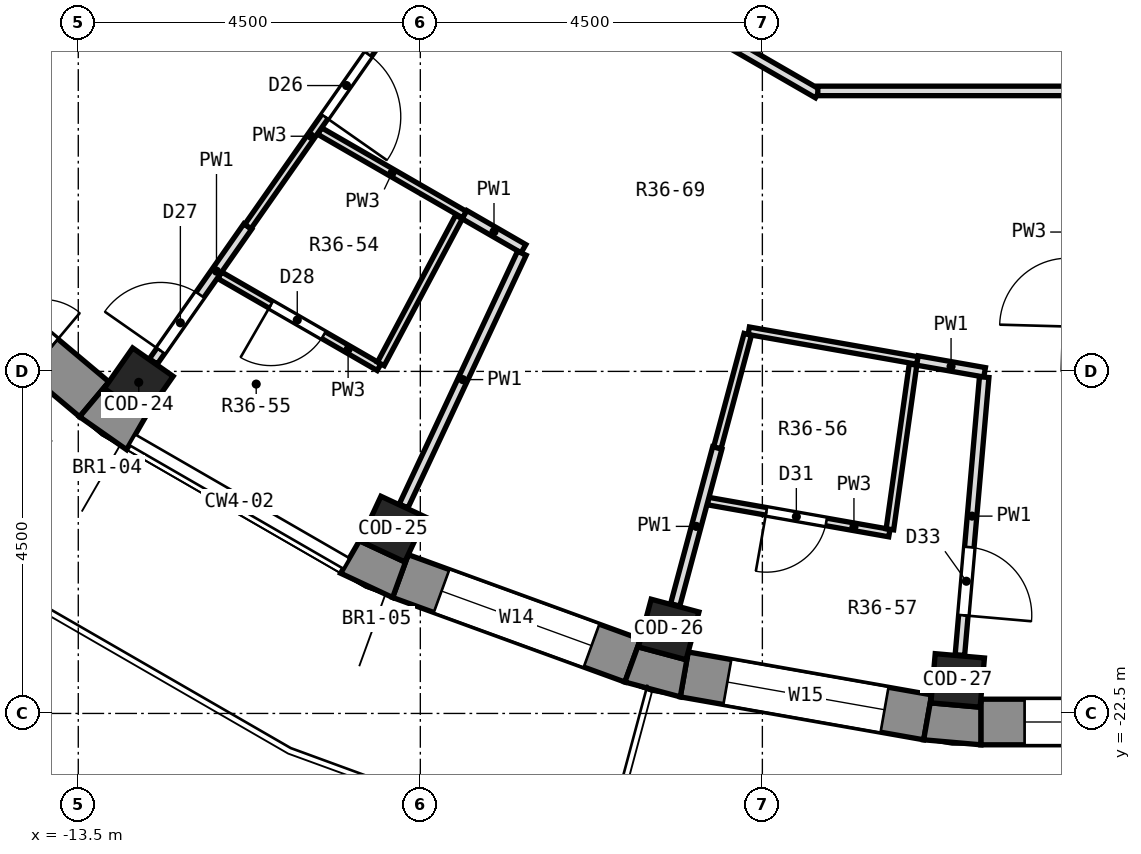
"""IFC4 building model, lengths in metres.
Left out: names, types, materials, properties, quantities, classifications, styles, units other than length and angle.
Written with IfcOpenShell. Run it as: python <this file> out.ifc"""

import sys

from ifc_helpers import new_model, si_unit, direction, frame, frame_2d, origin, origin_2d, place, context, subcontext, project, spatial, polyline, rectangle, outline, extrude, element, fill, save


model = new_model("IFC4")
c1 = context("Model", 3, precision=1e-05, world=origin(), true_north=direction((0.0, 1.0)))
c2 = subcontext(c1, "Body", "Model", "MODEL_VIEW")
j1 = project(units=[si_unit("LENGTHUNIT", "METRE"), si_unit("PLANEANGLEUNIT", "RADIAN")], contexts=[c1])
p1 = place(None, origin())
s1 = spatial("IfcSite", under=j1, at=p1, CompositionType="ELEMENT")
p2 = place(p1, origin())
s2 = spatial("IfcBuilding", under=s1, at=p2, CompositionType="ELEMENT")
p3 = place(p2, frame((0.0, 0.0, 259.4)))
s3 = spatial("IfcBuildingStorey", under=s2, at=p3, CompositionType="ELEMENT", Elevation=259.4)
for number, where, z_axis, x_axis in (
    (1, (-12.705, -18.144, 0.0), (0.0, 0.0, 1.0), (-0.574, -0.819, 0.0)),
    (2, (-9.361, -20.075, 0.0), (0.0, 0.0, 1.0), (-0.423, -0.906, 0.0)),
    (3, (-5.733, -21.395, 0.0), (0.0, 0.0, 1.0), (-0.259, -0.966, 0.0)),
    (4, (-1.93, -22.066, 0.0), (0.0, 0.0, 1.0), (-0.087, -0.996, 0.0)),
):
    element("IfcColumn", number, at=place(p3, frame(where, z_axis=z_axis, x_axis=x_axis)), inside=s3, PredefinedType="COLUMN", context=c2, shape_type="SweptSolid", body=[
        extrude(rectangle(XDim=0.65, YDim=0.65, at=origin_2d()), origin(), (0.0, 0.0, 1.0), 3.3),
    ])
p4 = place(p3, frame((-15.781, -16.277, 0.0), z_axis=(0.0, 0.0, 1.0), x_axis=(0.766056773982, -0.64277291405, 0.0)))
e5 = element("IfcWall", 5, at=p4, inside=s3, PredefinedType="SOLIDWALL", context=c2, shape_type="SweptSolid", body=[
    extrude(rectangle(XDim=3.252, YDim=0.6, at=frame_2d((1.626, 0.0))), origin(), (0.0, 0.0, 1.0), 2.9),
])
p5 = place(p4, frame((0.876, 0.0, 0.0)))
e6 = element("IfcOpeningElement", 6, at=p5, cuts=e5, PredefinedType="OPENING", context=c2, shape_type="SweptSolid", body=[
    extrude(rectangle(XDim=1.5, YDim=2.4, at=frame_2d((0.75, 1.2))), frame((0.0, 0.312, 0.0), z_axis=(0.0, -1.0, 0.0), x_axis=(1.0, 0.0, 0.0)), (0.0, 0.0, 1.0), 0.624),
])
p6 = place(p3, frame((-9.262, -20.693, 0.0), z_axis=(0.0, 0.0, 1.0), x_axis=(0.939679383794, -0.342056509473, 0.0)))
e7 = element("IfcWall", 7, at=p6, inside=s3, PredefinedType="SOLIDWALL", context=c2, shape_type="SweptSolid", body=[
    extrude(rectangle(XDim=3.252, YDim=0.6, at=frame_2d((1.626, 0.0))), origin(), (0.0, 0.0, 1.0), 2.9),
])
p7 = place(p6, frame((0.576, 0.0, 0.9)))
e8 = element("IfcOpeningElement", 8, at=p7, cuts=e7, PredefinedType="OPENING", context=c2, shape_type="SweptSolid", body=[
    extrude(rectangle(XDim=2.1, YDim=1.8, at=frame_2d((1.05, 0.9))), frame((0.0, 0.312, 0.0), z_axis=(0.0, -1.0, 0.0), x_axis=(1.0, 0.0, 0.0)), (0.0, 0.0, 1.0), 0.624),
])
p8 = place(p3, frame((-5.528, -21.987, 0.0), z_axis=(0.0, 0.0, 1.0), x_axis=(0.984806225186, -0.173656842178, 0.0)))
e9 = element("IfcWall", 9, at=p8, inside=s3, PredefinedType="SOLIDWALL", context=c2, shape_type="SweptSolid", body=[
    extrude(rectangle(XDim=3.252, YDim=0.6, at=frame_2d((1.626, 0.0))), origin(), (0.0, 0.0, 1.0), 2.9),
])
p9 = place(p8, frame((0.576, 0.0, 0.9)))
e10 = element("IfcOpeningElement", 10, at=p9, cuts=e9, PredefinedType="OPENING", context=c2, shape_type="SweptSolid", body=[
    extrude(rectangle(XDim=2.1, YDim=1.8, at=frame_2d((1.05, 0.9))), frame((0.0, 0.312, 0.0), z_axis=(0.0, -1.0, 0.0), x_axis=(1.0, 0.0, 0.0)), (0.0, 0.0, 1.0), 0.624),
])
p10 = place(p3, frame((-1.626, -22.613, 0.0), z_axis=(0.0, 0.0, 1.0), x_axis=(1.0, 0.0, 0.0)))
e11 = element("IfcWall", 11, at=p10, inside=s3, PredefinedType="SOLIDWALL", context=c2, shape_type="SweptSolid", body=[
    extrude(rectangle(XDim=3.251, YDim=0.6, at=frame_2d((1.626, 0.0))), origin(), (0.0, 0.0, 1.0), 2.9),
])
p11 = place(p10, frame((0.576, 0.0, 0.9)))
e12 = element("IfcOpeningElement", 12, at=p11, cuts=e11, PredefinedType="OPENING", context=c2, shape_type="SweptSolid", body=[
    extrude(rectangle(XDim=2.1, YDim=1.8, at=frame_2d((1.05, 0.9))), frame((0.0, 0.312, 0.0), z_axis=(0.0, -1.0, 0.0), x_axis=(1.0, 0.0, 0.0)), (0.0, 0.0, 1.0), 0.624),
])
p12 = place(p3, origin())
e13 = element("IfcWall", 13, at=p12, inside=s3, PredefinedType="SOLIDWALL", context=c2, shape_type="SweptSolid", body=[
    extrude(outline(polyline([(-12.864, -19.03), (-12.564, -18.51), (-12.625, -18.597), (-13.157, -18.224), (-13.097, -18.137), (-13.482, -18.597), (-12.864, -19.03)])), origin(), (0.0, 0.0, 1.0), 2.9),
])
p13 = place(p3, origin())
e14 = element("IfcWall", 14, at=p13, inside=s3, PredefinedType="SOLIDWALL", context=c2, shape_type="SweptSolid", body=[
    extrude(outline(polyline([(-10.048, -20.656), (-9.364, -20.975), (-9.159, -20.411), (-9.204, -20.507), (-9.793, -20.232), (-9.748, -20.136), (-10.048, -20.656)])), origin(), (0.0, 0.0, 1.0), 2.9),
])
p14 = place(p3, origin())
e15 = element("IfcWall", 15, at=p14, inside=s3, PredefinedType="SOLIDWALL", context=c2, shape_type="SweptSolid", body=[
    extrude(outline(polyline([(-5.58, -22.282), (-5.476, -21.691), (-5.503, -21.793), (-6.131, -21.625), (-6.104, -21.523), (-6.309, -22.087), (-5.58, -22.282)])), origin(), (0.0, 0.0, 1.0), 2.9),
])
p15 = place(p3, origin())
e16 = element("IfcWall", 16, at=p15, inside=s3, PredefinedType="SOLIDWALL", context=c2, shape_type="SweptSolid", body=[
    extrude(outline(polyline([(-2.378, -22.847), (-1.626, -22.913), (-1.626, -22.312), (-1.635, -22.418), (-2.283, -22.361), (-2.273, -22.256), (-2.378, -22.847)])), origin(), (0.0, 0.0, 1.0), 2.9),
])
p16 = place(p3, frame((-11.639, -16.735, 0.0), z_axis=(0.0, 0.0, 1.0), x_axis=(0.866093196455, -0.499882561262, 0.0)))
e17 = element("IfcWall", 17, at=p16, inside=s3, PredefinedType="PARTITIONING", context=c2, shape_type="SweptSolid", body=[
    extrude(rectangle(XDim=2.42, YDim=0.1, at=frame_2d((1.21, 0.0))), origin(), (0.0, 0.0, 1.0), 2.9),
])
p17 = place(p16, frame((0.778, 0.0, 0.0)))
e18 = element("IfcOpeningElement", 18, at=p17, cuts=e17, PredefinedType="OPENING", context=c2, shape_type="SweptSolid", body=[
    extrude(rectangle(XDim=0.8, YDim=2.1, at=frame_2d((0.4, 1.05))), frame((0.0, 0.062, 0.0), z_axis=(0.0, -1.0, 0.0), x_axis=(1.0, 0.0, 0.0)), (0.0, 0.0, 1.0), 0.124),
])
p18 = place(p3, frame((-10.324, -14.838, 0.0), z_axis=(0.0, 0.0, 1.0), x_axis=(0.866035918664, -0.499981787252, 0.0)))
e19 = element("IfcWall", 19, at=p18, inside=s3, PredefinedType="PARTITIONING", context=c2, shape_type="SweptSolid", body=[
    extrude(rectangle(XDim=2.2, YDim=0.1, at=frame_2d((1.1, 0.0))), origin(), (0.0, 0.0, 1.0), 2.9),
])
p19 = place(p3, frame((-8.419, -15.938, 0.0), z_axis=(0.0, 0.0, 1.0), x_axis=(0.866053945006, -0.499950561895, 0.0)))
e20 = element("IfcWall", 20, at=p19, inside=s3, PredefinedType="PARTITIONING", context=c2, shape_type="SweptSolid", body=[
    extrude(rectangle(XDim=0.896, YDim=0.125, at=frame_2d((0.448, 0.0))), origin(), (0.0, 0.0, 1.0), 2.9),
])
p20 = place(p3, frame((-10.476, -10.476, 0.0), z_axis=(0.0, 0.0, 1.0), x_axis=(0.866073222863, -0.499917165778, 0.0)))
e21 = element("IfcWall", 21, at=p20, inside=s3, PredefinedType="PARTITIONING", context=c2, shape_type="SweptSolid", body=[
    extrude(rectangle(XDim=7.742, YDim=0.125, at=frame_2d((3.871, 0.0))), origin(), (0.0, 0.0, 1.0), 2.9),
])
p21 = place(p3, frame((-5.215, -19.706, 0.0), z_axis=(0.0, 0.0, 1.0), x_axis=(0.984780515727, -0.173802577208, 0.0)))
e22 = element("IfcWall", 22, at=p21, inside=s3, PredefinedType="PARTITIONING", context=c2, shape_type="SweptSolid", body=[
    extrude(rectangle(XDim=2.423, YDim=0.1, at=frame_2d((1.211, 0.0))), origin(), (0.0, 0.0, 1.0), 2.9),
])
p22 = place(p21, frame((0.781, 0.0, 0.0)))
e23 = element("IfcOpeningElement", 23, at=p22, cuts=e22, PredefinedType="OPENING", context=c2, shape_type="SweptSolid", body=[
    extrude(rectangle(XDim=0.8, YDim=2.1, at=frame_2d((0.4, 1.05))), frame((0.0, 0.062, 0.0), z_axis=(0.0, -1.0, 0.0), x_axis=(1.0, 0.0, 0.0)), (0.0, 0.0, 1.0), 0.124),
])
p23 = place(p3, frame((-4.679, -17.465, 0.0), z_axis=(0.0, 0.0, 1.0), x_axis=(0.984785740028, -0.173772973268, 0.0)))
e24 = element("IfcWall", 24, at=p23, inside=s3, PredefinedType="PARTITIONING", context=c2, shape_type="SweptSolid", body=[
    extrude(rectangle(XDim=2.253, YDim=0.1, at=frame_2d((1.127, 0.0))), origin(), (0.0, 0.0, 1.0), 2.9),
])
p24 = place(p3, frame((-2.46, -17.857, 0.0), z_axis=(0.0, 0.0, 1.0), x_axis=(0.984914749924, -0.173040270981, 0.0)))
e25 = element("IfcWall", 25, at=p24, inside=s3, PredefinedType="PARTITIONING", context=c2, shape_type="SweptSolid", body=[
    extrude(rectangle(XDim=0.897, YDim=0.125, at=frame_2d((0.449, 0.0))), origin(), (0.0, 0.0, 1.0), 2.9),
])
p25 = place(p3, frame((-3.771, -14.31, 0.0), z_axis=(0.0, 0.0, 1.0), x_axis=(1.0, 0.0, 0.0)))
e26 = element("IfcWall", 26, at=p25, inside=s3, PredefinedType="PARTITIONING", context=c2, shape_type="SweptSolid", body=[
    extrude(rectangle(XDim=7.677, YDim=0.125, at=frame_2d((3.838, 0.0))), origin(), (0.0, 0.0, 1.0), 2.9),
])
p26 = place(p3, frame((-12.513, -17.87, 0.0), z_axis=(0.0, 0.0, 1.0), x_axis=(0.573296063173, 0.819348292212, 0.0)))
e27 = element("IfcWall", 27, at=p26, inside=s3, PredefinedType="PARTITIONING", context=c2, shape_type="SweptSolid", body=[
    extrude(rectangle(XDim=2.168, YDim=0.125, at=frame_2d((1.084, 0.0))), origin(), (0.0, 0.0, 1.0), 2.9),
])
p27 = place(p26, frame((0.171, 0.0, 0.0)))
e28 = element("IfcOpeningElement", 28, at=p27, cuts=e27, PredefinedType="OPENING", context=c2, shape_type="SweptSolid", body=[
    extrude(rectangle(XDim=0.9, YDim=2.1, at=frame_2d((0.45, 1.05))), frame((0.0, 0.074, 0.0), z_axis=(0.0, -1.0, 0.0), x_axis=(1.0, 0.0, 0.0)), (0.0, 0.0, 1.0), 0.149),
])
p28 = place(p3, frame((-11.269, -16.094, 0.0), z_axis=(0.0, 0.0, 1.0), x_axis=(0.573597334784, 0.819137410651, 0.0)))
e29 = element("IfcWall", 29, at=p28, inside=s3, PredefinedType="PARTITIONING", context=c2, shape_type="SweptSolid", body=[
    extrude(rectangle(XDim=5.219, YDim=0.1, at=frame_2d((2.609, 0.0))), origin(), (0.0, 0.0, 1.0), 2.9),
])
p29 = place(p28, frame((4.114, 0.0, 0.0)))
e30 = element("IfcOpeningElement", 30, at=p29, cuts=e29, PredefinedType="OPENING", context=c2, shape_type="SweptSolid", body=[
    extrude(rectangle(XDim=0.9, YDim=2.1, at=frame_2d((0.45, 1.05))), frame((0.0, 0.062, 0.0), z_axis=(0.0, -1.0, 0.0), x_axis=(1.0, 0.0, 0.0)), (0.0, 0.0, 1.0), 0.124),
])
p30 = place(p28, frame((3.014, 0.0, 0.0)))
e31 = element("IfcOpeningElement", 31, at=p30, cuts=e29, PredefinedType="OPENING", context=c2, shape_type="SweptSolid", body=[
    extrude(rectangle(XDim=0.9, YDim=2.1, at=frame_2d((0.45, 1.05))), frame((0.0, 0.062, 0.0), z_axis=(0.0, -1.0, 0.0), x_axis=(1.0, 0.0, 0.0)), (0.0, 0.0, 1.0), 0.124),
])
p31 = place(p28, frame((1.764, 0.0, 0.0)))
e32 = element("IfcOpeningElement", 32, at=p31, cuts=e29, PredefinedType="OPENING", context=c2, shape_type="SweptSolid", body=[
    extrude(rectangle(XDim=1.0, YDim=2.1, at=frame_2d((0.5, 1.05))), frame((0.0, 0.062, 0.0), z_axis=(0.0, -1.0, 0.0), x_axis=(1.0, 0.0, 0.0)), (0.0, 0.0, 1.0), 0.124),
])
p32 = place(p3, frame((-9.52, -17.901, 0.0), z_axis=(0.0, 0.0, 1.0), x_axis=(0.469644416179, 0.882855663374, 0.0)))
e33 = element("IfcWall", 33, at=p32, inside=s3, PredefinedType="PARTITIONING", context=c2, shape_type="SweptSolid", body=[
    extrude(rectangle(XDim=2.189, YDim=0.1, at=frame_2d((1.094, 0.0))), origin(), (0.0, 0.0, 1.0), 2.9),
])
p33 = place(p3, frame((-9.22, -19.771, 0.0), z_axis=(0.0, 0.0, 1.0), x_axis=(0.4238971674, 0.90571032426, 0.0)))
e34 = element("IfcWall", 34, at=p33, inside=s3, PredefinedType="PARTITIONING", context=c2, shape_type="SweptSolid", body=[
    extrude(rectangle(XDim=3.672, YDim=0.125, at=frame_2d((1.836, 0.0))), origin(), (0.0, 0.0, 1.0), 2.9),
])
p34 = place(p3, frame((-5.093, -19.007, 0.0), z_axis=(0.0, 0.0, 1.0), x_axis=(0.259175252444, 0.965830310417, 0.0)))
e35 = element("IfcWall", 35, at=p34, inside=s3, PredefinedType="PARTITIONING", context=c2, shape_type="SweptSolid", body=[
    extrude(rectangle(XDim=1.547, YDim=0.1, at=frame_2d((0.773, 0.0))), origin(), (0.0, 0.0, 1.0), 2.9),
])
p35 = place(p3, frame((-5.647, -21.072, 0.0), z_axis=(0.0, 0.0, 1.0), x_axis=(0.259084380683, 0.965854690772, 0.0)))
e36 = element("IfcWall", 36, at=p35, inside=s3, PredefinedType="PARTITIONING", context=c2, shape_type="SweptSolid", body=[
    extrude(rectangle(XDim=2.137, YDim=0.125, at=frame_2d((1.069, 0.0))), origin(), (0.0, 0.0, 1.0), 2.9),
])
p36 = place(p3, frame((-2.822, -20.077, 0.0), z_axis=(0.0, 0.0, 1.0), x_axis=(0.139000144369, 0.990292360803, 0.0)))
e37 = element("IfcWall", 37, at=p36, inside=s3, PredefinedType="PARTITIONING", context=c2, shape_type="SweptSolid", body=[
    extrude(rectangle(XDim=2.188, YDim=0.1, at=frame_2d((1.094, 0.0))), origin(), (0.0, 0.0, 1.0), 2.9),
])
p37 = place(p3, frame((-1.901, -21.732, 0.0), z_axis=(0.0, 0.0, 1.0), x_axis=(0.087128997152, 0.996197037666, 0.0)))
e38 = element("IfcWall", 38, at=p37, inside=s3, PredefinedType="PARTITIONING", context=c2, shape_type="SweptSolid", body=[
    extrude(rectangle(XDim=3.671, YDim=0.125, at=frame_2d((1.835, 0.0))), origin(), (0.0, 0.0, 1.0), 2.9),
])
p38 = place(p37, frame((0.525, 0.0, 0.0)))
e39 = element("IfcOpeningElement", 39, at=p38, cuts=e38, PredefinedType="OPENING", context=c2, shape_type="SweptSolid", body=[
    extrude(rectangle(XDim=0.9, YDim=2.1, at=frame_2d((0.45, 1.05))), frame((0.0, 0.074, 0.0), z_axis=(0.0, -1.0, 0.0), x_axis=(1.0, 0.0, 0.0)), (0.0, 0.0, 1.0), 0.149),
])
p39 = place(p7, origin())
e40 = element("IfcWindow", 40, at=p39, inside=s3, PartitioningType="SINGLE_PANEL", PredefinedType="WINDOW", context=c2, shape_type="SweptSolid", body=[
    extrude(rectangle(XDim=2.1, YDim=1.8, at=frame_2d((1.05, 0.9))), frame((0.0, 0.18, 0.0), z_axis=(0.0, -1.0, 0.0), x_axis=(1.0, 0.0, 0.0)), (0.0, 0.0, 1.0), 0.06),
])
fill(e8, e40)
p40 = place(p9, origin())
e41 = element("IfcWindow", 41, at=p40, inside=s3, PartitioningType="SINGLE_PANEL", PredefinedType="WINDOW", context=c2, shape_type="SweptSolid", body=[
    extrude(rectangle(XDim=2.1, YDim=1.8, at=frame_2d((1.05, 0.9))), frame((0.0, 0.18, 0.0), z_axis=(0.0, -1.0, 0.0), x_axis=(1.0, 0.0, 0.0)), (0.0, 0.0, 1.0), 0.06),
])
fill(e10, e41)
p41 = place(p11, origin())
e42 = element("IfcWindow", 42, at=p41, inside=s3, PartitioningType="SINGLE_PANEL", PredefinedType="WINDOW", context=c2, shape_type="SweptSolid", body=[
    extrude(rectangle(XDim=2.1, YDim=1.8, at=frame_2d((1.05, 0.9))), frame((0.0, 0.18, 0.0), z_axis=(0.0, -1.0, 0.0), x_axis=(1.0, 0.0, 0.0)), (0.0, 0.0, 1.0), 0.06),
])
fill(e12, e42)
p42 = place(p31, frame((1.0, 0.0, 0.0), z_axis=(0.0, 0.0, 1.0), x_axis=(-1.0, 0.0, 0.0)))
e43 = element("IfcDoor", 43, at=p42, inside=s3, OperationType="SINGLE_SWING_RIGHT", PredefinedType="DOOR", context=c2, shape_type="SweptSolid", body=[
    extrude(rectangle(XDim=1.0, YDim=2.1, at=frame_2d((0.5, 1.05))), frame((0.0, 0.025, 0.0), z_axis=(0.0, -1.0, 0.0), x_axis=(1.0, 0.0, 0.0)), (0.0, 0.0, 1.0), 0.05),
])
fill(e32, e43)
p43 = place(p27, origin())
e44 = element("IfcDoor", 44, at=p43, inside=s3, OperationType="SINGLE_SWING_LEFT", PredefinedType="DOOR", context=c2, shape_type="SweptSolid", body=[
    extrude(rectangle(XDim=0.9, YDim=2.1, at=frame_2d((0.45, 1.05))), frame((0.0, 0.025, 0.0), z_axis=(0.0, -1.0, 0.0), x_axis=(1.0, 0.0, 0.0)), (0.0, 0.0, 1.0), 0.05),
])
fill(e28, e44)
p44 = place(p17, frame((0.8, 0.0, 0.0), z_axis=(0.0, 0.0, 1.0), x_axis=(-1.0, 0.0, 0.0)))
e45 = element("IfcDoor", 45, at=p44, inside=s3, OperationType="SINGLE_SWING_RIGHT", PredefinedType="DOOR", context=c2, shape_type="SweptSolid", body=[
    extrude(rectangle(XDim=0.8, YDim=2.1, at=frame_2d((0.4, 1.05))), frame((0.0, 0.025, 0.0), z_axis=(0.0, -1.0, 0.0), x_axis=(1.0, 0.0, 0.0)), (0.0, 0.0, 1.0), 0.05),
])
fill(e18, e45)
p45 = place(p22, frame((0.8, 0.0, 0.0), z_axis=(0.0, 0.0, 1.0), x_axis=(-1.0, 0.0, 0.0)))
e46 = element("IfcDoor", 46, at=p45, inside=s3, OperationType="SINGLE_SWING_RIGHT", PredefinedType="DOOR", context=c2, shape_type="SweptSolid", body=[
    extrude(rectangle(XDim=0.8, YDim=2.1, at=frame_2d((0.4, 1.05))), frame((0.0, 0.025, 0.0), z_axis=(0.0, -1.0, 0.0), x_axis=(1.0, 0.0, 0.0)), (0.0, 0.0, 1.0), 0.05),
])
fill(e23, e46)
p46 = place(p38, frame((0.9, 0.0, 0.0), z_axis=(0.0, 0.0, 1.0), x_axis=(-1.0, 0.0, 0.0)))
e47 = element("IfcDoor", 47, at=p46, inside=s3, OperationType="SINGLE_SWING_RIGHT", PredefinedType="DOOR", context=c2, shape_type="SweptSolid", body=[
    extrude(rectangle(XDim=0.9, YDim=2.1, at=frame_2d((0.45, 1.05))), frame((0.0, 0.025, 0.0), z_axis=(0.0, -1.0, 0.0), x_axis=(1.0, 0.0, 0.0)), (0.0, 0.0, 1.0), 0.05),
])
fill(e39, e47)
save(model, sys.argv[1])
